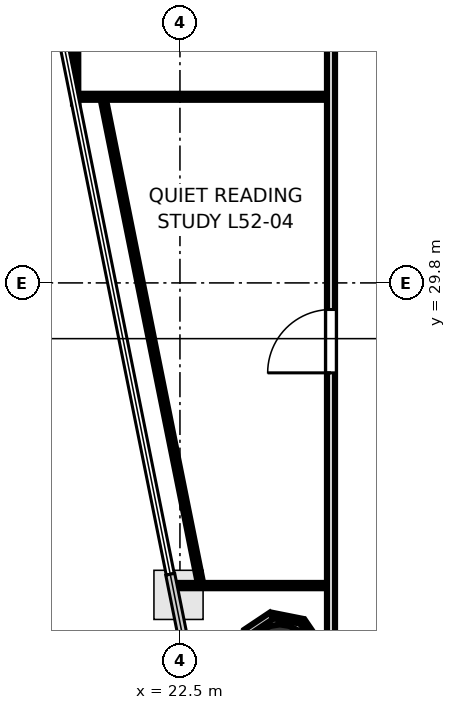
"""IFC4 building model, lengths in metres.
Left out: names, types, materials, properties, quantities, classifications, styles, units other than length and angle.
Written with IfcOpenShell. Run it as: python <this file> out.ifc"""

import sys

from ifc_helpers import new_model, si_unit, direction, frame, frame_2d, origin, origin_2d, place, context, subcontext, project, spatial, rectangle, hollow_circle, extrude, element, fill, save


model = new_model("IFC4")
c1 = context("Model", 3, precision=1e-05, world=origin(), true_north=direction((0.0, 1.0)))
c2 = subcontext(c1, "Body", "Model", "MODEL_VIEW")
j1 = project(units=[si_unit("LENGTHUNIT", "METRE"), si_unit("PLANEANGLEUNIT", "RADIAN")], contexts=[c1])
p1 = place(None, origin())
s1 = spatial("IfcSite", under=j1, at=p1, CompositionType="ELEMENT")
p2 = place(p1, origin())
s2 = spatial("IfcBuilding", under=s1, at=p2, CompositionType="ELEMENT")
p3 = place(p2, frame((0.0, 0.0, 204.0)))
s3 = spatial("IfcBuildingStorey", under=s2, at=p3, CompositionType="ELEMENT", Elevation=204.0)
p4 = place(p3, frame((24.472, 22.46, 0.0), z_axis=(0.0, 0.0, 1.0), x_axis=(1.0, 0.0, 0.0)))
e1 = element("IfcColumn", 1, at=p4, inside=s3, PredefinedType="COLUMN", context=c2, shape_type="SweptSolid", body=[
    extrude(hollow_circle(Radius=0.6, WallThickness=0.03, at=origin_2d()), origin(), (0.0, 0.0, 1.0), 3.7),
])
p5 = place(p3, frame((25.481, 18.05, 0.0), z_axis=(0.0, 0.0, 1.0), x_axis=(0.0, 1.0, 0.0)))
e2 = element("IfcWall", 2, at=p5, inside=s3, PredefinedType="PARTITIONING", context=c2, shape_type="SweptSolid", body=[
    extrude(rectangle(XDim=18.219, YDim=0.16, at=frame_2d((9.109, 0.0))), origin(), (0.0, 0.0, 1.0), 2.84),
])
p6 = place(p5, frame((0.23, 0.0, 0.0)))
e3 = element("IfcOpeningElement", 3, at=p6, cuts=e2, PredefinedType="OPENING", context=c2, shape_type="SweptSolid", body=[
    extrude(rectangle(XDim=1.05, YDim=2.15, at=frame_2d((0.525, 1.075))), frame((0.0, 0.09, 0.0), z_axis=(0.0, -1.0, 0.0), x_axis=(1.0, 0.0, 0.0)), (0.0, 0.0, 1.0), 0.18),
])
p7 = place(p5, frame((9.975, 0.0, 0.0)))
e4 = element("IfcOpeningElement", 4, at=p7, cuts=e2, PredefinedType="OPENING", context=c2, shape_type="SweptSolid", body=[
    extrude(rectangle(XDim=1.25, YDim=2.2, at=frame_2d((0.625, 1.1))), frame((0.0, 0.09, 0.0), z_axis=(0.0, -1.0, 0.0), x_axis=(1.0, 0.0, 0.0)), (0.0, 0.0, 1.0), 0.18),
])
p8 = place(p3, frame((25.238, 22.644, 0.0), z_axis=(0.0, 0.0, 1.0), x_axis=(-0.563363697458, 0.826209019792, 0.0)))
e5 = element("IfcWall", 5, at=p8, inside=s3, PredefinedType="PARTITIONING", context=c2, shape_type="SweptSolid", body=[
    extrude(rectangle(XDim=0.564, YDim=0.12, at=frame_2d((0.282, 0.0))), origin(), (0.0, 0.0, 1.0), 2.84),
])
p9 = place(p3, frame((24.9, 23.122, 0.0), z_axis=(0.0, 0.0, 1.0), x_axis=(-0.980773892286, 0.195147565217, 0.0)))
e6 = element("IfcWall", 6, at=p9, inside=s3, PredefinedType="PARTITIONING", context=c2, shape_type="SweptSolid", body=[
    extrude(rectangle(XDim=0.582, YDim=0.105, at=frame_2d((0.291, 0.0))), origin(), (0.0, 0.0, 1.0), 2.84),
])
p10 = place(p3, frame((24.306, 23.231, 0.0), z_axis=(0.0, 0.0, 1.0), x_axis=(-0.831274401047, -0.555862276256, 0.0)))
e7 = element("IfcWall", 7, at=p10, inside=s3, PredefinedType="PARTITIONING", context=c2, shape_type="SweptSolid", body=[
    extrude(rectangle(XDim=0.582, YDim=0.14, at=frame_2d((0.291, 0.0))), origin(), (0.0, 0.0, 1.0), 2.84),
])
p11 = place(p3, frame((22.333, 23.827, 0.0), z_axis=(0.0, 0.0, 1.0), x_axis=(1.0, 0.0, 0.0)))
e8 = element("IfcWall", 8, at=p11, inside=s3, PredefinedType="PARTITIONING", context=c2, shape_type="SweptSolid", body=[
    extrude(rectangle(XDim=3.037, YDim=0.105, at=frame_2d((1.519, 0.0))), origin(), (0.0, 0.0, 1.0), 2.84),
])
p12 = place(p3, frame((25.37, 33.473, 0.0), z_axis=(0.0, 0.0, 1.0), x_axis=(-1.0, 0.0, 0.0)))
e9 = element("IfcWall", 9, at=p12, inside=s3, PredefinedType="PARTITIONING", context=c2, shape_type="SweptSolid", body=[
    extrude(rectangle(XDim=4.975, YDim=0.12, at=frame_2d((2.488, 0.0))), origin(), (0.0, 0.0, 1.0), 2.84),
])
p13 = place(p3, frame((20.442, 33.34, 0.0), z_axis=(0.0, 0.0, 1.0), x_axis=(-0.000608960305, 0.999999814584, 0.0)))
e10 = element("IfcWall", 10, at=p13, inside=s3, PredefinedType="PARTITIONING", context=c2, shape_type="SweptSolid", body=[
    extrude(rectangle(XDim=2.806, YDim=0.105, at=frame_2d((1.403, 0.0))), origin(), (0.0, 0.0, 1.0), 2.84),
])
p14 = place(p3, frame((22.891, 23.948, 0.0), z_axis=(0.0, 0.0, 1.0), x_axis=(-0.196981324141, 0.980407240865, 0.0)))
e11 = element("IfcWall", 11, at=p14, inside=s3, PredefinedType="PARTITIONING", context=c2, shape_type="SweptSolid", body=[
    extrude(rectangle(XDim=9.604, YDim=0.105, at=frame_2d((4.802, 0.0))), origin(), (0.0, 0.0, 1.0), 2.84),
])
p15 = place(p7, origin())
e12 = element("IfcDoor", 12, at=p15, inside=s3, OperationType="SINGLE_SWING_LEFT", PredefinedType="DOOR", context=c2, shape_type="SweptSolid", body=[
    extrude(rectangle(XDim=1.25, YDim=2.2, at=frame_2d((0.625, 1.1))), frame((0.0, 0.025, 0.0), z_axis=(0.0, -1.0, 0.0), x_axis=(1.0, 0.0, 0.0)), (0.0, 0.0, 1.0), 0.05),
])
fill(e4, e12)
save(model, sys.argv[1])
